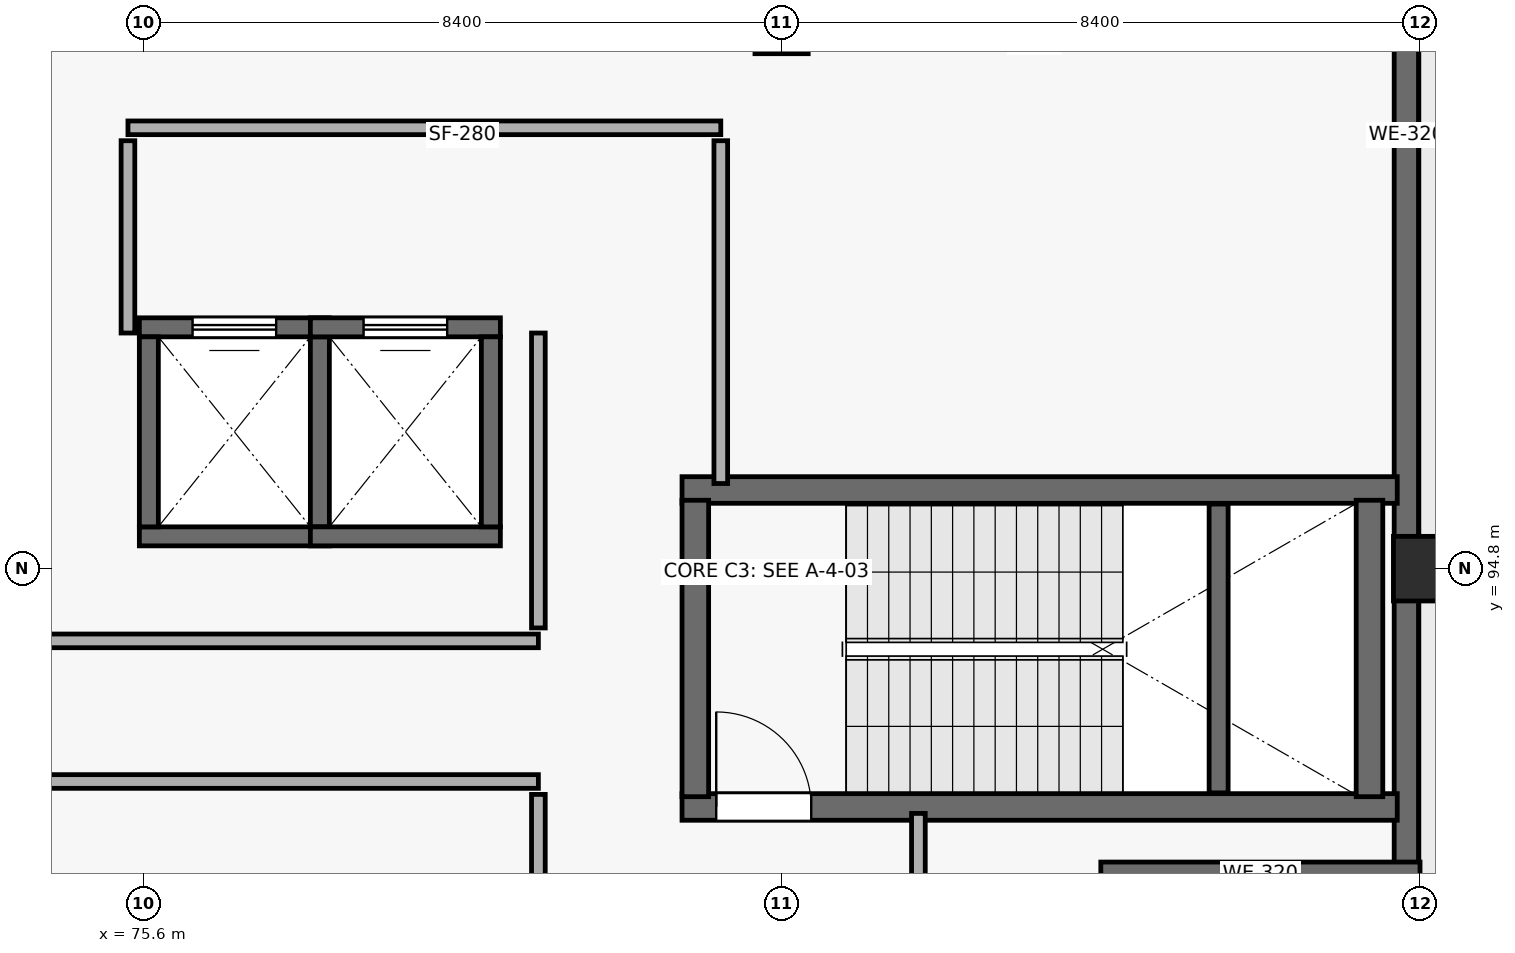
"""IFC4 building model, lengths in metres.
Left out: names, types, materials, properties, quantities, classifications, styles, units other than length and angle.
Written with IfcOpenShell. Run it as: python <this file> out.ifc"""

import sys

from ifc_helpers import new_model, si_unit, direction, frame, frame_2d, origin, origin_2d, place, context, subcontext, project, spatial, rectangle, extrude, element, fill, save


model = new_model("IFC4")
c1 = context("Model", 3, precision=1e-05, world=origin(), true_north=direction((0.0, 1.0)))
c2 = subcontext(c1, "Body", "Model", "MODEL_VIEW")
j1 = project(units=[si_unit("LENGTHUNIT", "METRE"), si_unit("PLANEANGLEUNIT", "RADIAN")], contexts=[c1])
p1 = place(None, origin())
s1 = spatial("IfcSite", under=j1, at=p1, CompositionType="ELEMENT")
p2 = place(p1, origin())
s2 = spatial("IfcBuilding", under=s1, at=p2, CompositionType="ELEMENT")
p3 = place(p2, frame((0.0, 0.0, 10.2)))
s3 = spatial("IfcBuildingStorey", under=s2, at=p3, CompositionType="ELEMENT", Elevation=10.2)
for number, where, z_axis, x_axis in (
    (1, (84.0, 102.0, 0.0), (0.0, 0.0, 1.0), (1.0, 0.0, 0.0)),
    (2, (92.4, 94.8, 0.0), (0.0, 0.0, 1.0), (1.0, 0.0, 0.0)),
):
    element("IfcColumn", number, at=place(p3, frame(where, z_axis=z_axis, x_axis=x_axis)), inside=s3, PredefinedType="COLUMN", context=c2, shape_type="SweptSolid", body=[
        extrude(rectangle(XDim=0.7, YDim=0.85, at=origin_2d()), origin(), (0.0, 0.0, 1.0), 5.1),
    ])
p4 = place(p3, frame((92.22, 110.4, 0.0), z_axis=(0.0, 0.0, 1.0), x_axis=(0.0, -1.0, 0.0)))
e3 = element("IfcWall", 3, at=p4, inside=s3, PredefinedType="SOLIDWALL", context=c2, shape_type="SweptSolid", body=[
    extrude(rectangle(XDim=19.8, YDim=0.32, at=frame_2d((9.9, 0.0))), origin(), (0.0, 0.0, 1.0), 4.82),
])
p5 = place(p4, frame((4.79, 0.0, 0.75)))
e4 = element("IfcOpeningElement", 4, at=p5, cuts=e3, PredefinedType="OPENING", context=c2, shape_type="SweptSolid", body=[
    extrude(rectangle(XDim=1.62, YDim=2.65, at=frame_2d((0.81, 1.325))), frame((0.0, 0.17, 0.0), z_axis=(0.0, -1.0, 0.0), x_axis=(1.0, 0.0, 0.0)), (0.0, 0.0, 1.0), 0.34),
])
p6 = place(p3, frame((92.4, 90.78, 0.0), z_axis=(0.0, 0.0, 1.0), x_axis=(-1.0, 0.0, 0.0)))
e5 = element("IfcWall", 5, at=p6, inside=s3, PredefinedType="SOLIDWALL", context=c2, shape_type="SweptSolid", body=[
    extrude(rectangle(XDim=4.2, YDim=0.32, at=frame_2d((2.1, 0.0))), origin(), (0.0, 0.0, 1.0), 4.82),
])
p7 = place(p3, frame((82.69, 91.665, 0.0), z_axis=(0.0, 0.0, 1.0), x_axis=(1.0, 0.0, 0.0)))
e6 = element("IfcWall", 6, at=p7, inside=s3, PredefinedType="SHEAR", context=c2, shape_type="SweptSolid", body=[
    extrude(rectangle(XDim=9.41, YDim=0.35, at=frame_2d((4.705, 0.0))), origin(), (0.0, 0.0, 1.0), 4.82),
])
p8 = place(p7, frame((0.45, 0.0, 0.0)))
e7 = element("IfcOpeningElement", 7, at=p8, cuts=e6, PredefinedType="OPENING", context=c2, shape_type="SweptSolid", body=[
    extrude(rectangle(XDim=1.25, YDim=2.2, at=frame_2d((0.625, 1.1))), frame((0.0, 0.185, 0.0), z_axis=(0.0, -1.0, 0.0), x_axis=(1.0, 0.0, 0.0)), (0.0, 0.0, 1.0), 0.37),
])
p9 = place(p3, frame((92.1, 95.835, 0.0), z_axis=(0.0, 0.0, 1.0), x_axis=(-1.0, 0.0, 0.0)))
e8 = element("IfcWall", 8, at=p9, inside=s3, PredefinedType="SHEAR", context=c2, shape_type="SweptSolid", body=[
    extrude(rectangle(XDim=9.41, YDim=0.35, at=frame_2d((4.705, 0.0))), origin(), (0.0, 0.0, 1.0), 4.82),
])
for number, where, z_axis, x_axis in (
    (9, (82.865, 91.8, 0.0), (0.0, 0.0, 1.0), (0.0, 1.0, 0.0)),
    (10, (91.735, 95.7, 0.0), (0.0, 0.0, 1.0), (0.0, -1.0, 0.0)),
):
    element("IfcWall", number, at=place(p3, frame(where, z_axis=z_axis, x_axis=x_axis)), inside=s3, PredefinedType="SHEAR", context=c2, shape_type="SweptSolid", body=[
        extrude(rectangle(XDim=3.9, YDim=0.35, at=frame_2d((1.95, 0.0))), origin(), (0.0, 0.0, 1.0), 4.82),
    ])
p10 = place(p3, frame((89.75, 91.85, 0.0), z_axis=(0.0, 0.0, 1.0), x_axis=(0.0, 1.0, 0.0)))
e11 = element("IfcWall", 11, at=p10, inside=s3, PredefinedType="SHEAR", context=c2, shape_type="SweptSolid", body=[
    extrude(rectangle(XDim=3.8, YDim=0.25, at=frame_2d((1.9, 0.0))), origin(), (0.0, 0.0, 1.0), 2.37),
])
p11 = place(p3, frame((75.55, 95.225, 0.0), z_axis=(0.0, 0.0, 1.0), x_axis=(1.0, 0.0, 0.0)))
e12 = element("IfcWall", 12, at=p11, inside=s3, PredefinedType="SHEAR", context=c2, shape_type="SweptSolid", body=[
    extrude(rectangle(XDim=2.5, YDim=0.25, at=frame_2d((1.25, 0.0))), origin(), (0.0, 0.0, 1.0), 4.82),
])
p12 = place(p3, frame((78.05, 97.975, 0.0), z_axis=(0.0, 0.0, 1.0), x_axis=(-1.0, 0.0, 0.0)))
e13 = element("IfcWall", 13, at=p12, inside=s3, PredefinedType="SHEAR", context=c2, shape_type="SweptSolid", body=[
    extrude(rectangle(XDim=2.5, YDim=0.25, at=frame_2d((1.25, 0.0))), origin(), (0.0, 0.0, 1.0), 4.82),
])
p13 = place(p12, frame((0.7, 0.0, 0.0)))
e14 = element("IfcOpeningElement", 14, at=p13, cuts=e13, PredefinedType="OPENING", context=c2, shape_type="SweptSolid", body=[
    extrude(rectangle(XDim=1.1, YDim=2.2, at=frame_2d((0.55, 1.1))), frame((0.0, 0.135, 0.0), z_axis=(0.0, -1.0, 0.0), x_axis=(1.0, 0.0, 0.0)), (0.0, 0.0, 1.0), 0.27),
])
for number, where, z_axis, x_axis in (
    (15, (75.675, 95.35, 0.0), (0.0, 0.0, 1.0), (0.0, 1.0, 0.0)),
    (16, (77.925, 97.85, 0.0), (0.0, 0.0, 1.0), (0.0, -1.0, 0.0)),
    (17, (77.8, 95.225, 0.0), (0.0, 0.0, 1.0), (1.0, 0.0, 0.0)),
):
    element("IfcWall", number, at=place(p3, frame(where, z_axis=z_axis, x_axis=x_axis)), inside=s3, PredefinedType="SHEAR", context=c2, shape_type="SweptSolid", body=[
        extrude(rectangle(XDim=2.5, YDim=0.25, at=frame_2d((1.25, 0.0))), origin(), (0.0, 0.0, 1.0), 4.82),
    ])
p14 = place(p3, frame((80.3, 97.975, 0.0), z_axis=(0.0, 0.0, 1.0), x_axis=(-1.0, 0.0, 0.0)))
e18 = element("IfcWall", 18, at=p14, inside=s3, PredefinedType="SHEAR", context=c2, shape_type="SweptSolid", body=[
    extrude(rectangle(XDim=2.5, YDim=0.25, at=frame_2d((1.25, 0.0))), origin(), (0.0, 0.0, 1.0), 4.82),
])
p15 = place(p14, frame((0.7, 0.0, 0.0)))
e19 = element("IfcOpeningElement", 19, at=p15, cuts=e18, PredefinedType="OPENING", context=c2, shape_type="SweptSolid", body=[
    extrude(rectangle(XDim=1.1, YDim=2.2, at=frame_2d((0.55, 1.1))), frame((0.0, 0.135, 0.0), z_axis=(0.0, -1.0, 0.0), x_axis=(1.0, 0.0, 0.0)), (0.0, 0.0, 1.0), 0.27),
])
p16 = place(p3, frame((80.175, 97.85, 0.0), z_axis=(0.0, 0.0, 1.0), x_axis=(0.0, -1.0, 0.0)))
e20 = element("IfcWall", 20, at=p16, inside=s3, PredefinedType="SHEAR", context=c2, shape_type="SweptSolid", body=[
    extrude(rectangle(XDim=2.5, YDim=0.25, at=frame_2d((1.25, 0.0))), origin(), (0.0, 0.0, 1.0), 4.82),
])
p17 = place(p3, frame((67.33, 92.0, 0.0), z_axis=(0.0, 0.0, 1.0), x_axis=(1.0, 0.0, 0.0)))
e21 = element("IfcWall", 21, at=p17, inside=s3, PredefinedType="PARTITIONING", context=c2, shape_type="SweptSolid", body=[
    extrude(rectangle(XDim=13.47, YDim=0.18, at=frame_2d((6.735, 0.0))), origin(), (0.0, 0.0, 1.0), 4.82),
])
p18 = place(p3, frame((80.8, 93.85, 0.0), z_axis=(0.0, 0.0, 1.0), x_axis=(-1.0, 0.0, 0.0)))
e22 = element("IfcWall", 22, at=p18, inside=s3, PredefinedType="PARTITIONING", context=c2, shape_type="SweptSolid", body=[
    extrude(rectangle(XDim=13.43, YDim=0.18, at=frame_2d((6.715, 0.0))), origin(), (0.0, 0.0, 1.0), 4.82),
])
p19 = place(p3, frame((83.2, 100.6, 0.0), z_axis=(0.0, 0.0, 1.0), x_axis=(-1.0, 0.0, 0.0)))
e23 = element("IfcWall", 23, at=p19, inside=s3, PredefinedType="PARTITIONING", context=c2, shape_type="SweptSolid", body=[
    extrude(rectangle(XDim=7.8, YDim=0.18, at=frame_2d((3.9, 0.0))), origin(), (0.0, 0.0, 1.0), 4.82),
])
p20 = place(p3, frame((83.2, 95.92, 0.0), z_axis=(0.0, 0.0, 1.0), x_axis=(0.0, 1.0, 0.0)))
e24 = element("IfcWall", 24, at=p20, inside=s3, PredefinedType="PARTITIONING", context=c2, shape_type="SweptSolid", body=[
    extrude(rectangle(XDim=4.51, YDim=0.18, at=frame_2d((2.255, 0.0))), origin(), (0.0, 0.0, 1.0), 4.82),
])
p21 = place(p3, frame((80.8, 97.9, 0.0), z_axis=(0.0, 0.0, 1.0), x_axis=(0.0, -1.0, 0.0)))
e25 = element("IfcWall", 25, at=p21, inside=s3, PredefinedType="PARTITIONING", context=c2, shape_type="SweptSolid", body=[
    extrude(rectangle(XDim=3.88, YDim=0.18, at=frame_2d((1.94, 0.0))), origin(), (0.0, 0.0, 1.0), 4.82),
])
p22 = place(p3, frame((80.8, 91.83, 0.0), z_axis=(0.0, 0.0, 1.0), x_axis=(0.0, -1.0, 0.0)))
e26 = element("IfcWall", 26, at=p22, inside=s3, PredefinedType="PARTITIONING", context=c2, shape_type="SweptSolid", body=[
    extrude(rectangle(XDim=2.46, YDim=0.18, at=frame_2d((1.23, 0.0))), origin(), (0.0, 0.0, 1.0), 4.82),
])
p23 = place(p3, frame((75.4, 100.43, 0.0), z_axis=(0.0, 0.0, 1.0), x_axis=(0.0, -1.0, 0.0)))
e27 = element("IfcWall", 27, at=p23, inside=s3, PredefinedType="PARTITIONING", context=c2, shape_type="SweptSolid", body=[
    extrude(rectangle(XDim=2.53, YDim=0.18, at=frame_2d((1.265, 0.0))), origin(), (0.0, 0.0, 1.0), 3.45),
])
p24 = place(p3, frame((85.8, 89.37, 0.0), z_axis=(0.0, 0.0, 1.0), x_axis=(0.0, 1.0, 0.0)))
e28 = element("IfcWall", 28, at=p24, inside=s3, PredefinedType="PARTITIONING", context=c2, shape_type="SweptSolid", body=[
    extrude(rectangle(XDim=2.21, YDim=0.18, at=frame_2d((1.105, 0.0))), origin(), (0.0, 0.0, 1.0), 4.82),
])
p25 = place(p8, origin())
e29 = element("IfcDoor", 29, at=p25, inside=s3, OperationType="SINGLE_SWING_LEFT", PredefinedType="DOOR", context=c2, shape_type="SweptSolid", body=[
    extrude(rectangle(XDim=1.25, YDim=2.2, at=frame_2d((0.625, 1.1))), frame((0.0, 0.025, 0.0), z_axis=(0.0, -1.0, 0.0), x_axis=(1.0, 0.0, 0.0)), (0.0, 0.0, 1.0), 0.05),
])
fill(e7, e29)
p26 = place(p13, origin())
e30 = element("IfcDoor", 30, at=p26, inside=s3, OperationType="SLIDING_TO_RIGHT", PredefinedType="DOOR", context=c2, shape_type="SweptSolid", body=[
    extrude(rectangle(XDim=1.1, YDim=2.2, at=frame_2d((0.55, 1.1))), frame((0.0, 0.025, 0.0), z_axis=(0.0, -1.0, 0.0), x_axis=(1.0, 0.0, 0.0)), (0.0, 0.0, 1.0), 0.05),
])
fill(e14, e30)
p27 = place(p15, origin())
e31 = element("IfcDoor", 31, at=p27, inside=s3, OperationType="SLIDING_TO_RIGHT", PredefinedType="DOOR", context=c2, shape_type="SweptSolid", body=[
    extrude(rectangle(XDim=1.1, YDim=2.2, at=frame_2d((0.55, 1.1))), frame((0.0, 0.025, 0.0), z_axis=(0.0, -1.0, 0.0), x_axis=(1.0, 0.0, 0.0)), (0.0, 0.0, 1.0), 0.05),
])
fill(e19, e31)
save(model, sys.argv[1])
